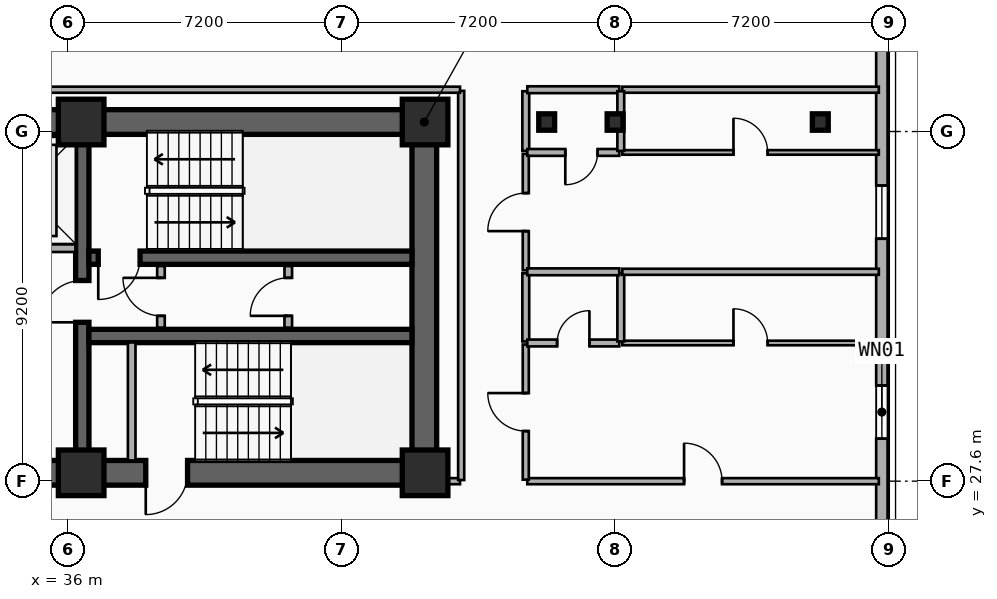
"""IFC4 building model, lengths in metres.
Left out: names, types, materials, properties, quantities, classifications, styles, units other than length and angle.
Written with IfcOpenShell. Run it as: python <this file> out.ifc"""

import sys

from ifc_helpers import new_model, si_unit, direction, frame, frame_2d, origin, origin_2d, place, context, subcontext, project, spatial, rectangle, i_section, extrude, element, fill, save


model = new_model("IFC4")
c1 = context("Model", 3, precision=1e-05, world=origin(), true_north=direction((0.0, 1.0)))
c2 = subcontext(c1, "Body", "Model", "MODEL_VIEW")
j1 = project(units=[si_unit("LENGTHUNIT", "METRE"), si_unit("PLANEANGLEUNIT", "RADIAN")], contexts=[c1])
p1 = place(None, origin())
s1 = spatial("IfcSite", under=j1, at=p1, CompositionType="ELEMENT")
p2 = place(p1, origin())
s2 = spatial("IfcBuilding", under=s1, at=p2, CompositionType="ELEMENT")
p3 = place(p2, frame((0.0, 0.0, 122.3)))
s3 = spatial("IfcBuildingStorey", under=s2, at=p3, CompositionType="ELEMENT", Elevation=122.3)
p4 = place(p3, frame((12.15, 37.05, 0.0), z_axis=(0.0, 0.0, 1.0), x_axis=(1.0, 0.0, 0.0)))
e1 = element("IfcWall", 1, at=p4, inside=s3, PredefinedType="SHEAR", context=c2, shape_type="SweptSolid", body=[
    extrude(rectangle(XDim=33.23, YDim=0.65, at=frame_2d((16.615, 0.0))), origin(), (0.0, 0.0, 1.0), 3.5),
])
p5 = place(p3, frame((45.38, 27.82, 0.0), z_axis=(0.0, 0.0, 1.0), x_axis=(-1.0, 0.0, 0.0)))
e2 = element("IfcWall", 2, at=p5, inside=s3, PredefinedType="SHEAR", context=c2, shape_type="SweptSolid", body=[
    extrude(rectangle(XDim=12.23, YDim=0.65, at=frame_2d((6.115, 0.0))), origin(), (0.0, 0.0, 1.0), 3.5),
])
p6 = place(p5, frame((9.93, 0.0, 0.0)))
e3 = element("IfcOpeningElement", 3, at=p6, cuts=e2, PredefinedType="OPENING", context=c2, shape_type="SweptSolid", body=[
    extrude(rectangle(XDim=1.1, YDim=2.15, at=frame_2d((0.55, 1.075))), frame((0.0, 0.335, 0.0), z_axis=(0.0, -1.0, 0.0), x_axis=(1.0, 0.0, 0.0)), (0.0, 0.0, 1.0), 0.67),
])
p7 = place(p5, frame((6.23, 0.0, 0.0)))
e4 = element("IfcOpeningElement", 4, at=p7, cuts=e2, PredefinedType="OPENING", context=c2, shape_type="SweptSolid", body=[
    extrude(rectangle(XDim=1.1, YDim=2.15, at=frame_2d((0.55, 1.075))), frame((0.0, 0.335, 0.0), z_axis=(0.0, -1.0, 0.0), x_axis=(1.0, 0.0, 0.0)), (0.0, 0.0, 1.0), 0.67),
])
p8 = place(p3, frame((45.38, 28.145, 0.0), z_axis=(0.0, 0.0, 1.0), x_axis=(0.0, 1.0, 0.0)))
e5 = element("IfcWall", 5, at=p8, inside=s3, PredefinedType="SHEAR", context=c2, shape_type="SweptSolid", body=[
    extrude(rectangle(XDim=8.58, YDim=0.65, at=frame_2d((4.29, 0.0))), origin(), (0.0, 0.0, 1.0), 3.5),
])
p9 = place(p3, frame((36.38, 28.145, 0.0), z_axis=(0.0, 0.0, 1.0), x_axis=(0.0, 1.0, 0.0)))
e6 = element("IfcWall", 6, at=p9, inside=s3, PredefinedType="SHEAR", context=c2, shape_type="SweptSolid", body=[
    extrude(rectangle(XDim=8.58, YDim=0.35, at=frame_2d((4.29, 0.0))), origin(), (0.0, 0.0, 1.0), 3.5),
])
p10 = place(p9, frame((3.635, 0.0, 0.0)))
e7 = element("IfcOpeningElement", 7, at=p10, cuts=e6, PredefinedType="OPENING", context=c2, shape_type="SweptSolid", body=[
    extrude(rectangle(XDim=1.1, YDim=2.15, at=frame_2d((0.55, 1.075))), frame((0.0, 0.185, 0.0), z_axis=(0.0, -1.0, 0.0), x_axis=(1.0, 0.0, 0.0)), (0.0, 0.0, 1.0), 0.37),
])
p11 = place(p3, frame((45.055, 33.48, 0.0), z_axis=(0.0, 0.0, 1.0), x_axis=(-1.0, 0.0, 0.0)))
e8 = element("IfcWall", 8, at=p11, inside=s3, PredefinedType="SHEAR", context=c2, shape_type="SweptSolid", body=[
    extrude(rectangle(XDim=8.5, YDim=0.35, at=frame_2d((4.25, 0.0))), origin(), (0.0, 0.0, 1.0), 3.5),
])
p12 = place(p11, frame((7.155, 0.0, 0.0)))
e9 = element("IfcOpeningElement", 9, at=p12, cuts=e8, PredefinedType="OPENING", context=c2, shape_type="SweptSolid", body=[
    extrude(rectangle(XDim=1.1, YDim=2.15, at=frame_2d((0.55, 1.075))), frame((0.0, 0.185, 0.0), z_axis=(0.0, -1.0, 0.0), x_axis=(1.0, 0.0, 0.0)), (0.0, 0.0, 1.0), 0.37),
])
p13 = place(p3, frame((36.555, 31.42, 0.0), z_axis=(0.0, 0.0, 1.0), x_axis=(1.0, 0.0, 0.0)))
e10 = element("IfcWall", 10, at=p13, inside=s3, PredefinedType="SHEAR", context=c2, shape_type="SweptSolid", body=[
    extrude(rectangle(XDim=8.5, YDim=0.35, at=frame_2d((4.25, 0.0))), origin(), (0.0, 0.0, 1.0), 3.5),
])
for number, where, z_axis, x_axis in (
    (11, (36.35, 27.82, 0.0), (0.0, 0.0, 1.0), (1.0, 0.0, 0.0)),
    (12, (36.35, 37.05, 0.0), (0.0, 0.0, 1.0), (1.0, 0.0, 0.0)),
    (13, (45.4, 27.82, 0.0), (0.0, 0.0, 1.0), (1.0, 0.0, 0.0)),
    (14, (45.4, 37.05, 0.0), (0.0, 0.0, 1.0), (1.0, 0.0, 0.0)),
):
    element("IfcColumn", number, at=place(p3, frame(where, z_axis=z_axis, x_axis=x_axis)), inside=s3, PredefinedType="COLUMN", context=c2, shape_type="SweptSolid", body=[
        extrude(rectangle(XDim=1.2, YDim=1.2, at=origin_2d()), origin(), (0.0, 0.0, 1.0), 3.5),
    ])
for number, where, z_axis, x_axis in (
    (15, (48.6, 37.05, 0.0), (0.0, 0.0, 1.0), (1.0, 0.0, 0.0)),
    (16, (50.4, 37.05, 0.0), (0.0, 0.0, 1.0), (1.0, 0.0, 0.0)),
    (17, (55.8, 37.05, 0.0), (0.0, 0.0, 1.0), (1.0, 0.0, 0.0)),
):
    element("IfcColumn", number, at=place(p3, frame(where, z_axis=z_axis, x_axis=x_axis)), inside=s3, PredefinedType="COLUMN", context=c2, shape_type="SweptSolid", body=[
        extrude(i_section(OverallWidth=0.418, OverallDepth=0.432, WebThickness=0.035, FlangeThickness=0.056, FilletRadius=0.015, at=origin_2d()), origin(), (0.0, 0.0, 1.0), 3.5),
    ])
p14 = place(p3, frame((57.42, 39.0, 0.0), z_axis=(0.0, 0.0, 1.0), x_axis=(0.0, -1.0, 0.0)))
e18 = element("IfcWall", 18, at=p14, inside=s3, PredefinedType="SOLIDWALL", context=c2, shape_type="SweptSolid", body=[
    extrude(rectangle(XDim=18.0, YDim=0.3, at=frame_2d((9.0, 0.0))), origin(), (0.0, 0.0, 1.0), 3.24),
])
p15 = place(p14, frame((8.882, 0.0, 0.48)))
e19 = element("IfcOpeningElement", 19, at=p15, cuts=e18, PredefinedType="OPENING", context=c2, shape_type="SweptSolid", body=[
    extrude(rectangle(XDim=1.4, YDim=1.8, at=frame_2d((0.7, 0.9))), frame((0.0, 0.16, 0.0), z_axis=(0.0, -1.0, 0.0), x_axis=(1.0, 0.0, 0.0)), (0.0, 0.0, 1.0), 0.32),
])
p16 = place(p14, frame((3.621, 0.0, 0.48)))
e20 = element("IfcOpeningElement", 20, at=p16, cuts=e18, PredefinedType="OPENING", context=c2, shape_type="SweptSolid", body=[
    extrude(rectangle(XDim=1.4, YDim=1.8, at=frame_2d((0.7, 0.9))), frame((0.0, 0.16, 0.0), z_axis=(0.0, -1.0, 0.0), x_axis=(1.0, 0.0, 0.0)), (0.0, 0.0, 1.0), 0.32),
])
p17 = place(p14, frame((14.625, 0.0, 0.48)))
e21 = element("IfcOpeningElement", 21, at=p17, cuts=e18, PredefinedType="OPENING", context=c2, shape_type="SweptSolid", body=[
    extrude(rectangle(XDim=1.4, YDim=1.8, at=frame_2d((0.7, 0.9))), frame((0.0, 0.16, 0.0), z_axis=(0.0, -1.0, 0.0), x_axis=(1.0, 0.0, 0.0)), (0.0, 0.0, 1.0), 0.32),
])
p18 = place(p3, frame((33.475, 33.73, 0.0), z_axis=(0.0, 0.0, 1.0), x_axis=(1.0, 0.0, 0.0)))
e22 = element("IfcWall", 22, at=p18, inside=s3, PredefinedType="PARTITIONING", context=c2, shape_type="SweptSolid", body=[
    extrude(rectangle(XDim=2.725, YDim=0.2, at=frame_2d((1.362, 0.0))), origin(), (0.0, 0.0, 1.0), 2.212),
])
p19 = place(p18, frame((0.812, 0.0, 0.0)))
e23 = element("IfcOpeningElement", 23, at=p19, cuts=e22, PredefinedType="OPENING", context=c2, shape_type="SweptSolid", body=[
    extrude(rectangle(XDim=1.1, YDim=2.15, at=frame_2d((0.55, 1.075))), frame((0.0, 0.11, 0.0), z_axis=(0.0, -1.0, 0.0), x_axis=(1.0, 0.0, 0.0)), (0.0, 0.0, 1.0), 0.22),
])
p20 = place(p3, frame((37.68, 28.145, 0.0), z_axis=(0.0, 0.0, 1.0), x_axis=(0.0, 1.0, 0.0)))
e24 = element("IfcWall", 24, at=p20, inside=s3, PredefinedType="PARTITIONING", context=c2, shape_type="SweptSolid", body=[
    extrude(rectangle(XDim=3.105, YDim=0.2, at=frame_2d((1.552, 0.0))), origin(), (0.0, 0.0, 1.0), 2.62),
])
p21 = place(p3, frame((38.45, 31.64, 0.0), z_axis=(0.0, 0.0, 1.0), x_axis=(0.0, 1.0, 0.0)))
e25 = element("IfcWall", 25, at=p21, inside=s3, PredefinedType="PARTITIONING", context=c2, shape_type="SweptSolid", body=[
    extrude(rectangle(XDim=1.62, YDim=0.2, at=frame_2d((0.81, 0.0))), origin(), (0.0, 0.0, 1.0), 3.24),
])
p22 = place(p21, frame((0.31, 0.0, 0.0)))
e26 = element("IfcOpeningElement", 26, at=p22, cuts=e25, PredefinedType="OPENING", context=c2, shape_type="SweptSolid", body=[
    extrude(rectangle(XDim=1.0, YDim=2.15, at=frame_2d((0.5, 1.075))), frame((0.0, 0.11, 0.0), z_axis=(0.0, -1.0, 0.0), x_axis=(1.0, 0.0, 0.0)), (0.0, 0.0, 1.0), 0.22),
])
p23 = place(p3, frame((41.8, 31.64, 0.0), z_axis=(0.0, 0.0, 1.0), x_axis=(0.0, 1.0, 0.0)))
e27 = element("IfcWall", 27, at=p23, inside=s3, PredefinedType="PARTITIONING", context=c2, shape_type="SweptSolid", body=[
    extrude(rectangle(XDim=1.62, YDim=0.2, at=frame_2d((0.81, 0.0))), origin(), (0.0, 0.0, 1.0), 3.24),
])
p24 = place(p23, frame((0.31, 0.0, 0.0)))
e28 = element("IfcOpeningElement", 28, at=p24, cuts=e27, PredefinedType="OPENING", context=c2, shape_type="SweptSolid", body=[
    extrude(rectangle(XDim=1.0, YDim=2.15, at=frame_2d((0.5, 1.075))), frame((0.0, 0.11, 0.0), z_axis=(0.0, -1.0, 0.0), x_axis=(1.0, 0.0, 0.0)), (0.0, 0.0, 1.0), 0.22),
])
p25 = place(p3, frame((48.09, 27.6, 0.0), z_axis=(0.0, 0.0, 1.0), x_axis=(1.0, 0.0, 0.0)))
e29 = element("IfcWall", 29, at=p25, inside=s3, PredefinedType="PARTITIONING", context=c2, shape_type="SweptSolid", body=[
    extrude(rectangle(XDim=9.25, YDim=0.16, at=frame_2d((4.625, 0.0))), origin(), (0.0, 0.0, 1.0), 2.57),
])
p26 = place(p25, frame((4.125, 0.0, 0.0)))
e30 = element("IfcOpeningElement", 30, at=p26, cuts=e29, PredefinedType="OPENING", context=c2, shape_type="SweptSolid", body=[
    extrude(rectangle(XDim=1.0, YDim=2.15, at=frame_2d((0.5, 1.075))), frame((0.0, 0.09, 0.0), z_axis=(0.0, -1.0, 0.0), x_axis=(1.0, 0.0, 0.0)), (0.0, 0.0, 1.0), 0.18),
])
p27 = place(p3, frame((48.05, 27.64, 0.0), z_axis=(0.0, 0.0, 1.0), x_axis=(0.0, 1.0, 0.0)))
e31 = element("IfcWall", 31, at=p27, inside=s3, PredefinedType="PARTITIONING", context=c2, shape_type="SweptSolid", body=[
    extrude(rectangle(XDim=3.556, YDim=0.16, at=frame_2d((1.778, 0.0))), origin(), (0.0, 0.0, 1.0), 3.24),
])
p28 = place(p27, frame((1.278, 0.0, 0.0)))
e32 = element("IfcOpeningElement", 32, at=p28, cuts=e31, PredefinedType="OPENING", context=c2, shape_type="SweptSolid", body=[
    extrude(rectangle(XDim=1.0, YDim=2.15, at=frame_2d((0.5, 1.075))), frame((0.0, 0.09, 0.0), z_axis=(0.0, -1.0, 0.0), x_axis=(1.0, 0.0, 0.0)), (0.0, 0.0, 1.0), 0.18),
])
p29 = place(p3, frame((48.05, 31.276, 0.0), z_axis=(0.0, 0.0, 1.0), x_axis=(0.0, 1.0, 0.0)))
e33 = element("IfcWall", 33, at=p29, inside=s3, PredefinedType="PLUMBINGWALL", context=c2, shape_type="SweptSolid", body=[
    extrude(rectangle(XDim=1.793, YDim=0.18, at=frame_2d((0.896, 0.0))), origin(), (0.0, 0.0, 1.0), 3.24),
])
p30 = place(p3, frame((48.05, 33.149, 0.0), z_axis=(0.0, 0.0, 1.0), x_axis=(0.0, 1.0, 0.0)))
e34 = element("IfcWall", 34, at=p30, inside=s3, PredefinedType="PARTITIONING", context=c2, shape_type="SweptSolid", body=[
    extrude(rectangle(XDim=3.061, YDim=0.16, at=frame_2d((1.531, 0.0))), origin(), (0.0, 0.0, 1.0), 3.24),
])
p31 = place(p30, frame((1.031, 0.0, 0.0)))
e35 = element("IfcOpeningElement", 35, at=p31, cuts=e34, PredefinedType="OPENING", context=c2, shape_type="SweptSolid", body=[
    extrude(rectangle(XDim=1.0, YDim=2.15, at=frame_2d((0.5, 1.075))), frame((0.0, 0.09, 0.0), z_axis=(0.0, -1.0, 0.0), x_axis=(1.0, 0.0, 0.0)), (0.0, 0.0, 1.0), 0.18),
])
p32 = place(p3, frame((48.05, 36.29, 0.0), z_axis=(0.0, 0.0, 1.0), x_axis=(0.0, 1.0, 0.0)))
e36 = element("IfcWall", 36, at=p32, inside=s3, PredefinedType="PLUMBINGWALL", context=c2, shape_type="SweptSolid", body=[
    extrude(rectangle(XDim=1.57, YDim=0.18, at=frame_2d((0.785, 0.0))), origin(), (0.0, 0.0, 1.0), 2.72),
])
p33 = place(p3, frame((48.09, 37.9, 0.0), z_axis=(0.0, 0.0, 1.0), x_axis=(1.0, 0.0, 0.0)))
e37 = element("IfcWall", 37, at=p33, inside=s3, PredefinedType="PLUMBINGWALL", context=c2, shape_type="SweptSolid", body=[
    extrude(rectangle(XDim=2.42, YDim=0.18, at=frame_2d((1.21, 0.0))), origin(), (0.0, 0.0, 1.0), 3.24),
])
p34 = place(p3, frame((50.59, 37.9, 0.0), z_axis=(0.0, 0.0, 1.0), x_axis=(1.0, 0.0, 0.0)))
e38 = element("IfcWall", 38, at=p34, inside=s3, PredefinedType="PARTITIONING", context=c2, shape_type="SweptSolid", body=[
    extrude(rectangle(XDim=6.75, YDim=0.16, at=frame_2d((3.375, 0.0))), origin(), (0.0, 0.0, 1.0), 3.24),
])
p35 = place(p3, frame((48.09, 31.236, 0.0), z_axis=(0.0, 0.0, 1.0), x_axis=(1.0, 0.0, 0.0)))
e39 = element("IfcWall", 39, at=p35, inside=s3, PredefinedType="PLUMBINGWALL", context=c2, shape_type="SweptSolid", body=[
    extrude(rectangle(XDim=2.42, YDim=0.18, at=frame_2d((1.21, 0.0))), origin(), (0.0, 0.0, 1.0), 2.57),
])
p36 = place(p35, frame((0.785, 0.0, 0.0)))
e40 = element("IfcOpeningElement", 40, at=p36, cuts=e39, PredefinedType="OPENING", context=c2, shape_type="SweptSolid", body=[
    extrude(rectangle(XDim=0.85, YDim=2.1, at=frame_2d((0.425, 1.05))), frame((0.0, 0.1, 0.0), z_axis=(0.0, -1.0, 0.0), x_axis=(1.0, 0.0, 0.0)), (0.0, 0.0, 1.0), 0.2),
])
p37 = place(p3, frame((50.59, 31.236, 0.0), z_axis=(0.0, 0.0, 1.0), x_axis=(1.0, 0.0, 0.0)))
e41 = element("IfcWall", 41, at=p37, inside=s3, PredefinedType="PARTITIONING", context=c2, shape_type="SweptSolid", body=[
    extrude(rectangle(XDim=6.75, YDim=0.12, at=frame_2d((3.375, 0.0))), origin(), (0.0, 0.0, 1.0), 2.57),
])
p38 = place(p37, frame((2.925, 0.0, 0.0)))
e42 = element("IfcOpeningElement", 42, at=p38, cuts=e41, PredefinedType="OPENING", context=c2, shape_type="SweptSolid", body=[
    extrude(rectangle(XDim=0.9, YDim=2.1, at=frame_2d((0.45, 1.05))), frame((0.0, 0.07, 0.0), z_axis=(0.0, -1.0, 0.0), x_axis=(1.0, 0.0, 0.0)), (0.0, 0.0, 1.0), 0.14),
])
p39 = place(p3, frame((50.55, 31.276, 0.0), z_axis=(0.0, 0.0, 1.0), x_axis=(0.0, 1.0, 0.0)))
e43 = element("IfcWall", 43, at=p39, inside=s3, PredefinedType="PLUMBINGWALL", context=c2, shape_type="SweptSolid", body=[
    extrude(rectangle(XDim=1.793, YDim=0.18, at=frame_2d((0.896, 0.0))), origin(), (0.0, 0.0, 1.0), 2.57),
])
p40 = place(p3, frame((48.09, 33.109, 0.0), z_axis=(0.0, 0.0, 1.0), x_axis=(1.0, 0.0, 0.0)))
e44 = element("IfcWall", 44, at=p40, inside=s3, PredefinedType="PLUMBINGWALL", context=c2, shape_type="SweptSolid", body=[
    extrude(rectangle(XDim=2.42, YDim=0.18, at=frame_2d((1.21, 0.0))), origin(), (0.0, 0.0, 1.0), 2.57),
])
p41 = place(p3, frame((50.59, 33.109, 0.0), z_axis=(0.0, 0.0, 1.0), x_axis=(1.0, 0.0, 0.0)))
e45 = element("IfcWall", 45, at=p41, inside=s3, PredefinedType="PARTITIONING", context=c2, shape_type="SweptSolid", body=[
    extrude(rectangle(XDim=6.75, YDim=0.16, at=frame_2d((3.375, 0.0))), origin(), (0.0, 0.0, 1.0), 2.57),
])
p42 = place(p3, frame((50.51, 36.25, 0.0), z_axis=(0.0, 0.0, 1.0), x_axis=(-1.0, 0.0, 0.0)))
e46 = element("IfcWall", 46, at=p42, inside=s3, PredefinedType="PLUMBINGWALL", context=c2, shape_type="SweptSolid", body=[
    extrude(rectangle(XDim=2.42, YDim=0.18, at=frame_2d((1.21, 0.0))), origin(), (0.0, 0.0, 1.0), 2.57),
])
p43 = place(p42, frame((0.57, 0.0, 0.0)))
e47 = element("IfcOpeningElement", 47, at=p43, cuts=e46, PredefinedType="OPENING", context=c2, shape_type="SweptSolid", body=[
    extrude(rectangle(XDim=0.85, YDim=2.1, at=frame_2d((0.425, 1.05))), frame((0.0, 0.1, 0.0), z_axis=(0.0, -1.0, 0.0), x_axis=(1.0, 0.0, 0.0)), (0.0, 0.0, 1.0), 0.2),
])
p44 = place(p3, frame((50.59, 36.25, 0.0), z_axis=(0.0, 0.0, 1.0), x_axis=(1.0, 0.0, 0.0)))
e48 = element("IfcWall", 48, at=p44, inside=s3, PredefinedType="PARTITIONING", context=c2, shape_type="SweptSolid", body=[
    extrude(rectangle(XDim=6.75, YDim=0.12, at=frame_2d((3.375, 0.0))), origin(), (0.0, 0.0, 1.0), 2.57),
])
p45 = place(p44, frame((2.925, 0.0, 0.0)))
e49 = element("IfcOpeningElement", 49, at=p45, cuts=e48, PredefinedType="OPENING", context=c2, shape_type="SweptSolid", body=[
    extrude(rectangle(XDim=0.9, YDim=2.1, at=frame_2d((0.45, 1.05))), frame((0.0, 0.07, 0.0), z_axis=(0.0, -1.0, 0.0), x_axis=(1.0, 0.0, 0.0)), (0.0, 0.0, 1.0), 0.14),
])
p46 = place(p3, frame((50.55, 36.29, 0.0), z_axis=(0.0, 0.0, 1.0), x_axis=(0.0, 1.0, 0.0)))
e50 = element("IfcWall", 50, at=p46, inside=s3, PredefinedType="PLUMBINGWALL", context=c2, shape_type="SweptSolid", body=[
    extrude(rectangle(XDim=1.57, YDim=0.18, at=frame_2d((0.785, 0.0))), origin(), (0.0, 0.0, 1.0), 2.57),
])
p47 = place(p3, frame((45.41, 27.6, 0.0), z_axis=(0.0, 0.0, 1.0), x_axis=(1.0, 0.0, 0.0)))
e51 = element("IfcWall", 51, at=p47, inside=s3, PredefinedType="PARTITIONING", context=c2, shape_type="SweptSolid", body=[
    extrude(rectangle(XDim=0.91, YDim=0.16, at=frame_2d((0.455, 0.0))), origin(), (0.0, 0.0, 1.0), 2.28),
])
p48 = place(p3, frame((46.35, 27.63, 0.0), z_axis=(0.0, 0.0, 1.0), x_axis=(0.0, 1.0, 0.0)))
e52 = element("IfcWall", 52, at=p48, inside=s3, PredefinedType="PARTITIONING", context=c2, shape_type="SweptSolid", body=[
    extrude(rectangle(XDim=10.24, YDim=0.16, at=frame_2d((5.12, 0.0))), origin(), (0.0, 0.0, 1.0), 2.72),
])
p49 = place(p3, frame((11.28, 37.9, 0.0), z_axis=(0.0, 0.0, 1.0), x_axis=(1.0, 0.0, 0.0)))
e53 = element("IfcWall", 53, at=p49, inside=s3, PredefinedType="PARTITIONING", context=c2, shape_type="SweptSolid", body=[
    extrude(rectangle(XDim=35.04, YDim=0.16, at=frame_2d((17.52, 0.0))), origin(), (0.0, 0.0, 1.0), 3.24),
])
p50 = place(p15, origin())
e54 = element("IfcWindow", 54, at=p50, inside=s3, PartitioningType="SINGLE_PANEL", PredefinedType="WINDOW", context=c2, shape_type="SweptSolid", body=[
    extrude(rectangle(XDim=1.4, YDim=1.8, at=frame_2d((0.7, 0.9))), frame((0.0, 0.03, 0.0), z_axis=(0.0, -1.0, 0.0), x_axis=(1.0, 0.0, 0.0)), (0.0, 0.0, 1.0), 0.06),
])
fill(e19, e54)
p51 = place(p16, origin())
e55 = element("IfcWindow", 55, at=p51, inside=s3, PartitioningType="SINGLE_PANEL", PredefinedType="WINDOW", context=c2, shape_type="SweptSolid", body=[
    extrude(rectangle(XDim=1.4, YDim=1.8, at=frame_2d((0.7, 0.9))), frame((0.0, 0.03, 0.0), z_axis=(0.0, -1.0, 0.0), x_axis=(1.0, 0.0, 0.0)), (0.0, 0.0, 1.0), 0.06),
])
fill(e20, e55)
p52 = place(p12, origin())
e56 = element("IfcDoor", 56, at=p52, inside=s3, OperationType="SINGLE_SWING_RIGHT", PredefinedType="DOOR", context=c2, shape_type="SweptSolid", body=[
    extrude(rectangle(XDim=1.1, YDim=2.15, at=frame_2d((0.55, 1.075))), frame((0.0, 0.025, 0.0), z_axis=(0.0, -1.0, 0.0), x_axis=(1.0, 0.0, 0.0)), (0.0, 0.0, 1.0), 0.05),
])
fill(e9, e56)
p53 = place(p10, origin())
e57 = element("IfcDoor", 57, at=p53, inside=s3, OperationType="SINGLE_SWING_LEFT", PredefinedType="DOOR", context=c2, shape_type="SweptSolid", body=[
    extrude(rectangle(XDim=1.1, YDim=2.15, at=frame_2d((0.55, 1.075))), frame((0.0, 0.025, 0.0), z_axis=(0.0, -1.0, 0.0), x_axis=(1.0, 0.0, 0.0)), (0.0, 0.0, 1.0), 0.05),
])
fill(e7, e57)
p54 = place(p7, origin())
e58 = element("IfcDoor", 58, at=p54, inside=s3, OperationType="SINGLE_SWING_RIGHT", PredefinedType="DOOR", context=c2, shape_type="SweptSolid", body=[
    extrude(rectangle(XDim=1.1, YDim=2.15, at=frame_2d((0.55, 1.075))), frame((0.0, 0.025, 0.0), z_axis=(0.0, -1.0, 0.0), x_axis=(1.0, 0.0, 0.0)), (0.0, 0.0, 1.0), 0.05),
])
fill(e4, e58)
p55 = place(p22, origin())
e59 = element("IfcDoor", 59, at=p55, inside=s3, OperationType="SINGLE_SWING_RIGHT", PredefinedType="DOOR", context=c2, shape_type="SweptSolid", body=[
    extrude(rectangle(XDim=1.0, YDim=2.15, at=frame_2d((0.5, 1.075))), frame((0.0, 0.025, 0.0), z_axis=(0.0, -1.0, 0.0), x_axis=(1.0, 0.0, 0.0)), (0.0, 0.0, 1.0), 0.05),
])
fill(e26, e59)
p56 = place(p24, origin())
e60 = element("IfcDoor", 60, at=p56, inside=s3, OperationType="SINGLE_SWING_LEFT", PredefinedType="DOOR", context=c2, shape_type="SweptSolid", body=[
    extrude(rectangle(XDim=1.0, YDim=2.15, at=frame_2d((0.5, 1.075))), frame((0.0, 0.025, 0.0), z_axis=(0.0, -1.0, 0.0), x_axis=(1.0, 0.0, 0.0)), (0.0, 0.0, 1.0), 0.05),
])
fill(e28, e60)
p57 = place(p26, origin())
e61 = element("IfcDoor", 61, at=p57, inside=s3, OperationType="SINGLE_SWING_LEFT", PredefinedType="DOOR", context=c2, shape_type="SweptSolid", body=[
    extrude(rectangle(XDim=1.0, YDim=2.15, at=frame_2d((0.5, 1.075))), frame((0.0, 0.025, 0.0), z_axis=(0.0, -1.0, 0.0), x_axis=(1.0, 0.0, 0.0)), (0.0, 0.0, 1.0), 0.05),
])
fill(e30, e61)
p58 = place(p28, origin())
e62 = element("IfcDoor", 62, at=p58, inside=s3, OperationType="SINGLE_SWING_RIGHT", PredefinedType="DOOR", context=c2, shape_type="SweptSolid", body=[
    extrude(rectangle(XDim=1.0, YDim=2.15, at=frame_2d((0.5, 1.075))), frame((0.0, 0.025, 0.0), z_axis=(0.0, -1.0, 0.0), x_axis=(1.0, 0.0, 0.0)), (0.0, 0.0, 1.0), 0.05),
])
fill(e32, e62)
p59 = place(p31, origin())
e63 = element("IfcDoor", 63, at=p59, inside=s3, OperationType="SINGLE_SWING_LEFT", PredefinedType="DOOR", context=c2, shape_type="SweptSolid", body=[
    extrude(rectangle(XDim=1.0, YDim=2.15, at=frame_2d((0.5, 1.075))), frame((0.0, 0.025, 0.0), z_axis=(0.0, -1.0, 0.0), x_axis=(1.0, 0.0, 0.0)), (0.0, 0.0, 1.0), 0.05),
])
fill(e35, e63)
p60 = place(p36, origin())
e64 = element("IfcDoor", 64, at=p60, inside=s3, OperationType="SINGLE_SWING_RIGHT", PredefinedType="DOOR", context=c2, shape_type="SweptSolid", body=[
    extrude(rectangle(XDim=0.85, YDim=2.1, at=frame_2d((0.425, 1.05))), frame((0.0, 0.025, 0.0), z_axis=(0.0, -1.0, 0.0), x_axis=(1.0, 0.0, 0.0)), (0.0, 0.0, 1.0), 0.05),
])
fill(e40, e64)
p61 = place(p38, origin())
e65 = element("IfcDoor", 65, at=p61, inside=s3, OperationType="SINGLE_SWING_LEFT", PredefinedType="DOOR", context=c2, shape_type="SweptSolid", body=[
    extrude(rectangle(XDim=0.9, YDim=2.1, at=frame_2d((0.45, 1.05))), frame((0.0, 0.025, 0.0), z_axis=(0.0, -1.0, 0.0), x_axis=(1.0, 0.0, 0.0)), (0.0, 0.0, 1.0), 0.05),
])
fill(e42, e65)
p62 = place(p43, origin())
e66 = element("IfcDoor", 66, at=p62, inside=s3, OperationType="SINGLE_SWING_RIGHT", PredefinedType="DOOR", context=c2, shape_type="SweptSolid", body=[
    extrude(rectangle(XDim=0.85, YDim=2.1, at=frame_2d((0.425, 1.05))), frame((0.0, 0.025, 0.0), z_axis=(0.0, -1.0, 0.0), x_axis=(1.0, 0.0, 0.0)), (0.0, 0.0, 1.0), 0.05),
])
fill(e47, e66)
p63 = place(p45, origin())
e67 = element("IfcDoor", 67, at=p63, inside=s3, OperationType="SINGLE_SWING_LEFT", PredefinedType="DOOR", context=c2, shape_type="SweptSolid", body=[
    extrude(rectangle(XDim=0.9, YDim=2.1, at=frame_2d((0.45, 1.05))), frame((0.0, 0.025, 0.0), z_axis=(0.0, -1.0, 0.0), x_axis=(1.0, 0.0, 0.0)), (0.0, 0.0, 1.0), 0.05),
])
fill(e49, e67)
save(model, sys.argv[1])
